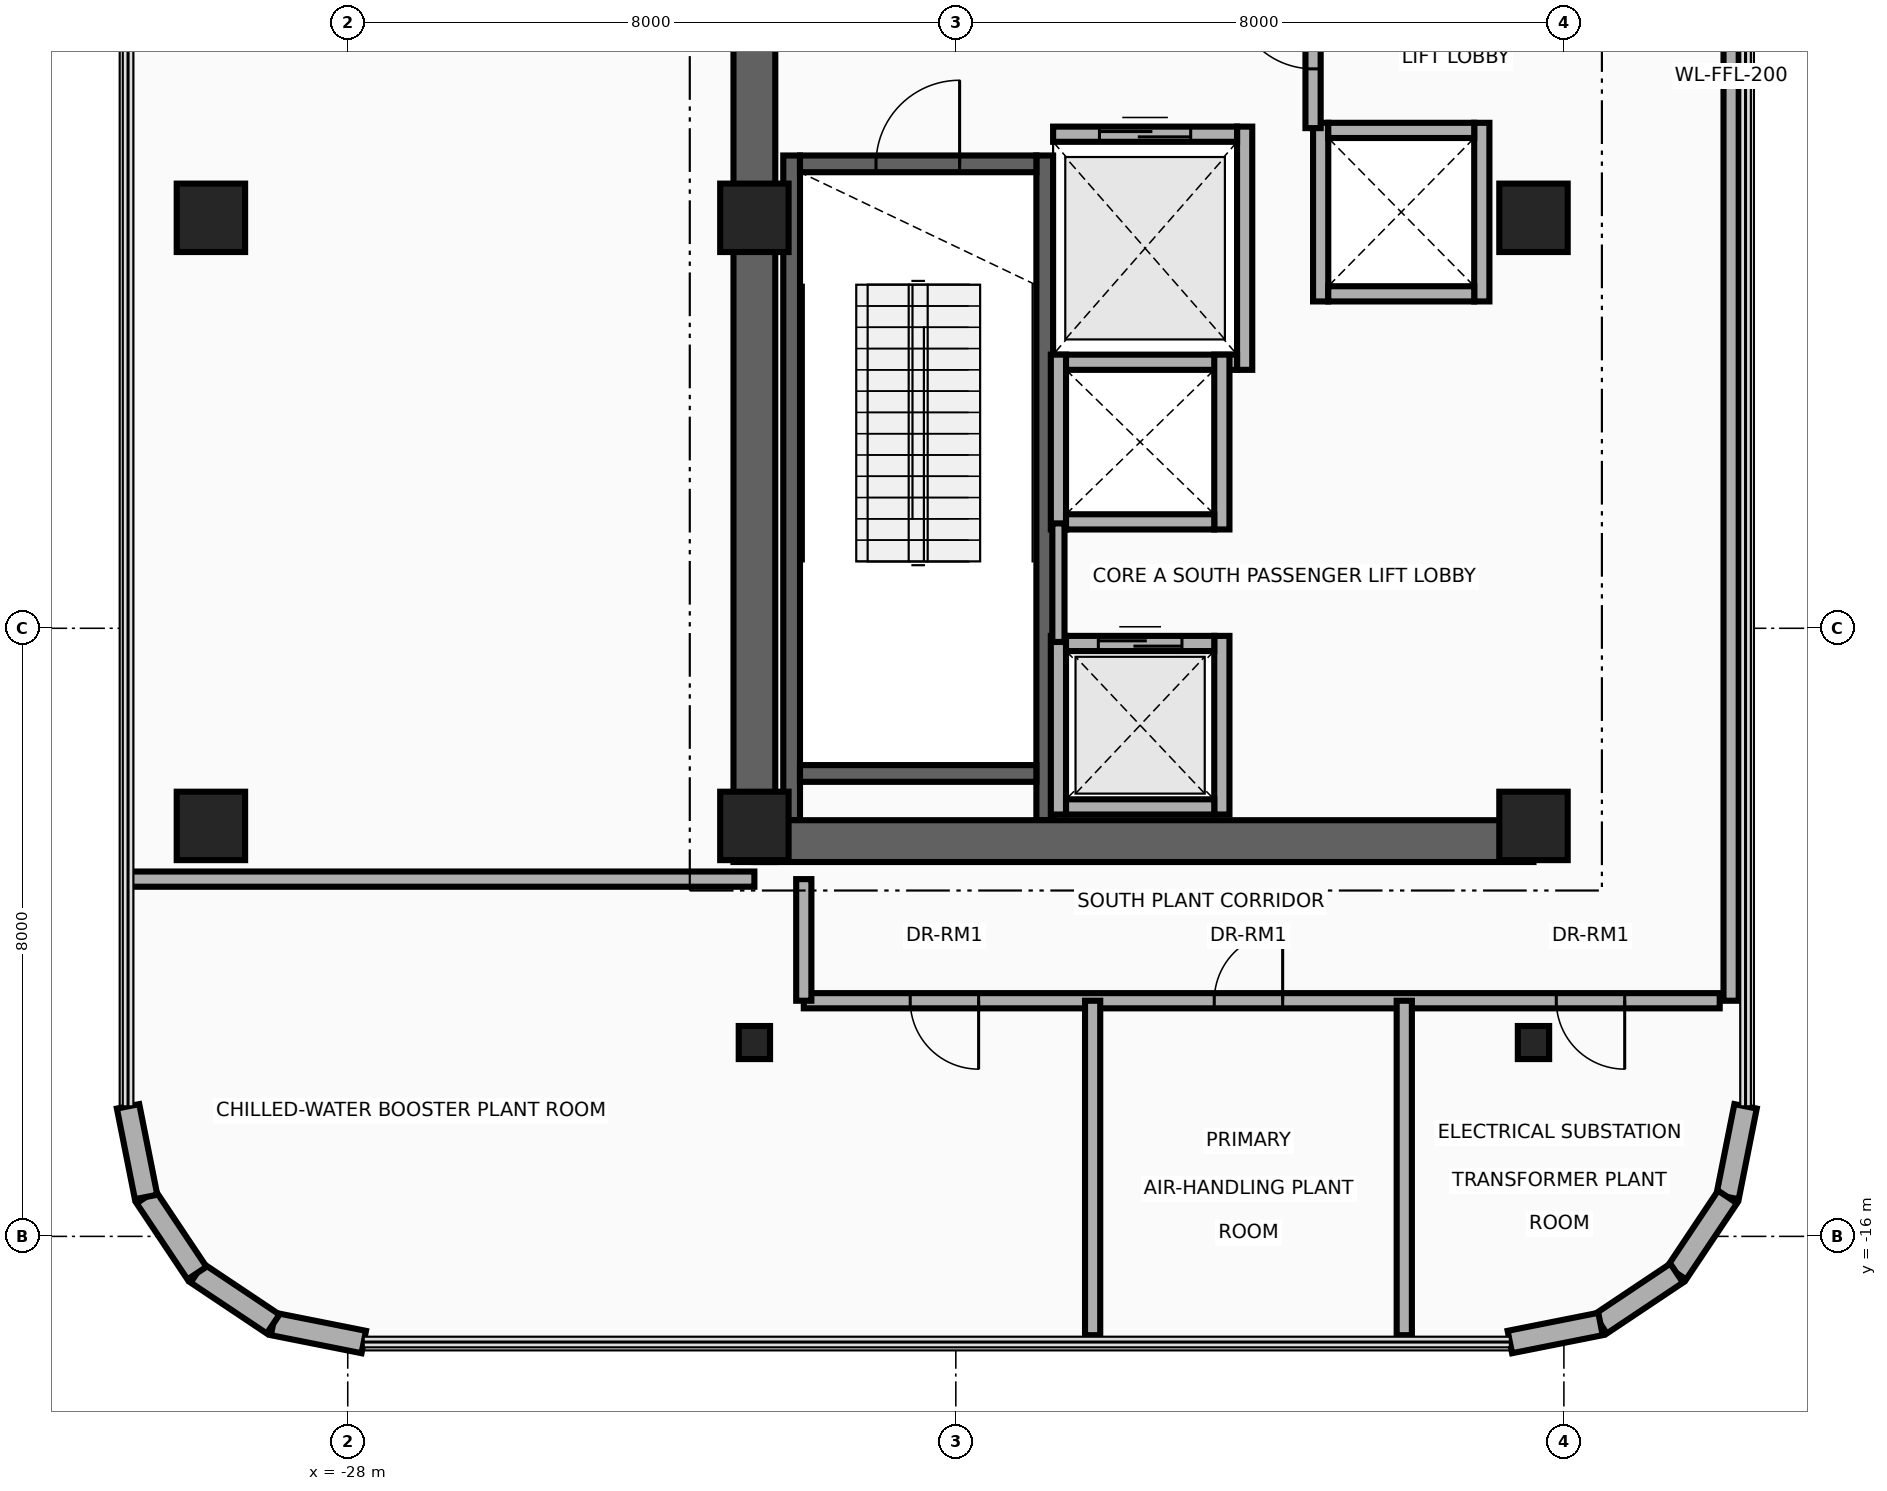
"""IFC4 building model, lengths in metres.
Left out: names, types, materials, properties, quantities, classifications, styles, units other than length and angle.
Written with IfcOpenShell. Run it as: python <this file> out.ifc"""

import sys

from ifc_helpers import new_model, si_unit, direction, frame, frame_2d, origin, origin_2d, place, context, subcontext, project, spatial, rectangle, i_section, extrude, source, transform, mapped, element, fill, save


model = new_model("IFC4")
c1 = context("Model", 3, precision=1e-05, world=origin(), true_north=direction((0.0, 1.0)))
c2 = subcontext(c1, "Body", "Model", "MODEL_VIEW")
j1 = project(units=[si_unit("LENGTHUNIT", "METRE"), si_unit("PLANEANGLEUNIT", "RADIAN")], contexts=[c1])
p1 = place(None, origin())
s1 = spatial("IfcSite", under=j1, at=p1, CompositionType="ELEMENT")
p2 = place(p1, origin())
s2 = spatial("IfcBuilding", under=s1, at=p2, CompositionType="ELEMENT")
p3 = place(p2, frame((0.0, 0.0, 196.3)))
s3 = spatial("IfcBuildingStorey", under=s2, at=p3, CompositionType="ELEMENT", Elevation=196.3)
for number, where, z_axis, x_axis in (
    (1, (-22.16, -10.525, 0.0), (0.0, 0.0, 1.0), (0.0, 1.0, 0.0)),
    (2, (-18.83, -10.525, 0.0), (0.0, 0.0, 1.0), (0.0, 1.0, 0.0)),
):
    element("IfcWall", number, at=place(p3, frame(where, z_axis=z_axis, x_axis=x_axis)), inside=s3, PredefinedType="SHEAR", context=c2, shape_type="SweptSolid", body=[
        extrude(rectangle(XDim=8.745, YDim=0.22, at=frame_2d((4.373, 0.0))), origin(), (0.0, 0.0, 1.0), 4.46),
    ])
p4 = place(p3, frame((-22.05, -9.91, 0.0), z_axis=(0.0, 0.0, 1.0), x_axis=(1.0, 0.0, 0.0)))
e3 = element("IfcWall", 3, at=p4, inside=s3, PredefinedType="SHEAR", context=c2, shape_type="SweptSolid", body=[
    extrude(rectangle(XDim=3.11, YDim=0.22, at=frame_2d((1.555, 0.0))), origin(), (0.0, 0.0, 1.0), 4.46),
])
p5 = place(p3, frame((-22.05, -1.89, 0.0), z_axis=(0.0, 0.0, 1.0), x_axis=(1.0, 0.0, 0.0)))
e4 = element("IfcWall", 4, at=p5, inside=s3, PredefinedType="SHEAR", context=c2, shape_type="SweptSolid", body=[
    extrude(rectangle(XDim=3.11, YDim=0.22, at=frame_2d((1.555, 0.0))), origin(), (0.0, 0.0, 1.0), 4.46),
])
p6 = place(p5, frame((1.0, 0.0, 0.0)))
e5 = element("IfcOpeningElement", 5, at=p6, cuts=e4, PredefinedType="OPENING", context=c2, shape_type="SweptSolid", body=[
    extrude(rectangle(XDim=1.1, YDim=2.15, at=frame_2d((0.55, 1.075))), frame((0.0, 0.125, 0.0), z_axis=(0.0, -1.0, 0.0), x_axis=(1.0, 0.0, 0.0)), (0.0, 0.0, 1.0), 0.25),
])
p7 = place(p3, frame((-22.65, -11.075, 0.0), z_axis=(0.0, 0.0, 1.0), x_axis=(0.0, 1.0, 0.0)))
e6 = element("IfcWall", 6, at=p7, inside=s3, PredefinedType="SHEAR", context=c2, shape_type="SweptSolid", body=[
    extrude(rectangle(XDim=22.15, YDim=0.55, at=frame_2d((11.075, 0.0))), origin(), (0.0, 0.0, 1.0), 4.46),
])
p8 = place(p3, frame((-22.65, -10.8, 0.0), z_axis=(0.0, 0.0, 1.0), x_axis=(1.0, 0.0, 0.0)))
e7 = element("IfcWall", 7, at=p8, inside=s3, PredefinedType="SHEAR", context=c2, shape_type="SweptSolid", body=[
    extrude(rectangle(XDim=10.25, YDim=0.55, at=frame_2d((5.125, 0.0))), origin(), (0.0, 0.0, 1.0), 4.46),
])
m1 = source(origin(), c2, "Body", "SweptSolid", [
    extrude(rectangle(XDim=0.9, YDim=0.9, at=origin_2d()), origin(), (0.0, 0.0, 1.0), 4.7),
])
for number, where, z_axis, x_axis in (
    (8, (-29.8, -10.6, 0.0), (0.0, 0.0, 1.0), (1.0, 0.0, 0.0)),
    (9, (-22.65, -10.6, 0.0), (0.0, 0.0, 1.0), (1.0, 0.0, 0.0)),
    (10, (-12.4, -10.6, 0.0), (0.0, 0.0, 1.0), (1.0, 0.0, 0.0)),
    (11, (-29.8, -2.6, 0.0), (0.0, 0.0, 1.0), (1.0, 0.0, 0.0)),
    (12, (-22.65, -2.6, 0.0), (0.0, 0.0, 1.0), (1.0, 0.0, 0.0)),
    (13, (-12.4, -2.6, 0.0), (0.0, 0.0, 1.0), (1.0, 0.0, 0.0)),
):
    element("IfcColumn", number, at=place(p3, frame(where, z_axis=z_axis, x_axis=x_axis)), inside=s3, PredefinedType="COLUMN", context=c2, shape_type="MappedRepresentation", body=[
        mapped(m1, transform((0.0, 0.0, 0.0), x_axis=(1.0, 0.0, 0.0), y_axis=(0.0, 1.0, 0.0), z_axis=(0.0, 0.0, 1.0), scale=1.0)),
    ])
m2 = source(origin(), c2, "Body", "SweptSolid", [
    extrude(i_section(OverallWidth=0.412, OverallDepth=0.435, WebThickness=0.036, FlangeThickness=0.057, at=origin_2d()), origin(), (0.0, 0.0, 1.0), 4.7),
])
for number, where, z_axis, x_axis in (
    (14, (-22.65, -13.45, 0.0), (0.0, 0.0, 1.0), (1.0, 0.0, 0.0)),
    (15, (-12.4, -13.45, 0.0), (0.0, 0.0, 1.0), (1.0, 0.0, 0.0)),
):
    element("IfcColumn", number, at=place(p3, frame(where, z_axis=z_axis, x_axis=x_axis)), inside=s3, PredefinedType="COLUMN", context=c2, shape_type="MappedRepresentation", body=[
        mapped(m2, transform((0.0, 0.0, 0.0), x_axis=(1.0, 0.0, 0.0), y_axis=(0.0, 1.0, 0.0), z_axis=(0.0, 0.0, 1.0), scale=1.0)),
    ])
p9 = place(p3, frame((-9.61, -14.289, 0.0), z_axis=(0.0, 0.0, 1.0), x_axis=(-0.194996050505, -0.980804027463, 0.0)))
e16 = element("IfcWall", 16, at=p9, inside=s3, PredefinedType="SOLIDWALL", context=c2, shape_type="SweptSolid", body=[
    extrude(rectangle(XDim=1.216, YDim=0.3, at=frame_2d((0.608, 0.0))), origin(), (0.0, 0.0, 1.0), 4.46),
])
for number, where, z_axis, x_axis in (
    (17, (-9.847, -15.482, 0.0), (0.0, 0.0, 1.0), (-0.556, -0.831, 0.0)),
    (18, (-10.517, -16.483, 0.0), (0.0, 0.0, 1.0), (-0.831, -0.556, 0.0)),
):
    element("IfcWall", number, at=place(p3, frame(where, z_axis=z_axis, x_axis=x_axis)), inside=s3, PredefinedType="SOLIDWALL", context=c2, shape_type="SweptSolid", body=[
        extrude(rectangle(XDim=1.205, YDim=0.3, at=frame_2d((0.603, 0.0))), origin(), (0.0, 0.0, 1.0), 4.46),
    ])
for number, where, z_axis, x_axis in (
    (19, (-11.518, -17.153, 0.0), (0.0, 0.0, 1.0), (-0.981, -0.195, 0.0)),
    (20, (-27.789, -17.39, 0.0), (0.0, 0.0, 1.0), (-0.981, 0.195, 0.0)),
):
    element("IfcWall", number, at=place(p3, frame(where, z_axis=z_axis, x_axis=x_axis)), inside=s3, PredefinedType="SOLIDWALL", context=c2, shape_type="SweptSolid", body=[
        extrude(rectangle(XDim=1.216, YDim=0.3, at=frame_2d((0.608, 0.0))), origin(), (0.0, 0.0, 1.0), 4.46),
    ])
for number, where, z_axis, x_axis in (
    (21, (-28.982, -17.153, 0.0), (0.0, 0.0, 1.0), (-0.831, 0.556, 0.0)),
    (22, (-29.983, -16.483, 0.0), (0.0, 0.0, 1.0), (-0.556, 0.831, 0.0)),
):
    element("IfcWall", number, at=place(p3, frame(where, z_axis=z_axis, x_axis=x_axis)), inside=s3, PredefinedType="SOLIDWALL", context=c2, shape_type="SweptSolid", body=[
        extrude(rectangle(XDim=1.205, YDim=0.3, at=frame_2d((0.603, 0.0))), origin(), (0.0, 0.0, 1.0), 4.46),
    ])
p10 = place(p3, frame((-30.653, -15.482, 0.0), z_axis=(0.0, 0.0, 1.0), x_axis=(-0.194996050505, 0.980804027463, 0.0)))
e23 = element("IfcWall", 23, at=p10, inside=s3, PredefinedType="SOLIDWALL", context=c2, shape_type="SweptSolid", body=[
    extrude(rectangle(XDim=1.216, YDim=0.3, at=frame_2d((0.608, 0.0))), origin(), (0.0, 0.0, 1.0), 4.46),
])
p11 = place(p3, frame((-16.2, -4.6, 0.0), z_axis=(0.0, 0.0, 1.0), x_axis=(0.0, 1.0, 0.0)))
e24 = element("IfcWall", 24, at=p11, inside=s3, PredefinedType="MOVABLE", context=c2, shape_type="SweptSolid", body=[
    extrude(rectangle(XDim=3.2, YDim=0.2, at=frame_2d((1.6, 0.0))), origin(), (0.0, 0.0, 1.0), 4.46),
])
p12 = place(p3, frame((-18.72, -4.5, 0.0), z_axis=(0.0, 0.0, 1.0), x_axis=(1.0, 0.0, 0.0)))
e25 = element("IfcWall", 25, at=p12, inside=s3, PredefinedType="MOVABLE", context=c2, shape_type="SweptSolid", body=[
    extrude(rectangle(XDim=2.42, YDim=0.2, at=frame_2d((1.21, 0.0))), origin(), (0.0, 0.0, 1.0), 4.46),
])
p13 = place(p3, frame((-18.72, -1.5, 0.0), z_axis=(0.0, 0.0, 1.0), x_axis=(1.0, 0.0, 0.0)))
e26 = element("IfcWall", 26, at=p13, inside=s3, PredefinedType="MOVABLE", context=c2, shape_type="SweptSolid", body=[
    extrude(rectangle(XDim=2.42, YDim=0.2, at=frame_2d((1.21, 0.0))), origin(), (0.0, 0.0, 1.0), 4.46),
])
p14 = place(p13, frame((0.61, 0.0, 0.0)))
e27 = element("IfcOpeningElement", 27, at=p14, cuts=e26, PredefinedType="OPENING", context=c2, shape_type="SweptSolid", body=[
    extrude(rectangle(XDim=1.2, YDim=2.1, at=frame_2d((0.6, 1.05))), frame((0.0, 0.115, 0.0), z_axis=(0.0, -1.0, 0.0), x_axis=(1.0, 0.0, 0.0)), (0.0, 0.0, 1.0), 0.23),
])
for number, where, z_axis, x_axis in (
    (28, (-18.65, -10.45, 0.0), (0.0, 0.0, 1.0), (0.0, 1.0, 0.0)),
    (29, (-16.5, -10.45, 0.0), (0.0, 0.0, 1.0), (0.0, 1.0, 0.0)),
):
    element("IfcWall", number, at=place(p3, frame(where, z_axis=z_axis, x_axis=x_axis)), inside=s3, PredefinedType="MOVABLE", context=c2, shape_type="SweptSolid", body=[
        extrude(rectangle(XDim=2.35, YDim=0.2, at=frame_2d((1.175, 0.0))), origin(), (0.0, 0.0, 1.0), 3.744),
    ])
p15 = place(p3, frame((-18.55, -10.35, 0.0), z_axis=(0.0, 0.0, 1.0), x_axis=(1.0, 0.0, 0.0)))
e30 = element("IfcWall", 30, at=p15, inside=s3, PredefinedType="MOVABLE", context=c2, shape_type="SweptSolid", body=[
    extrude(rectangle(XDim=1.95, YDim=0.2, at=frame_2d((0.975, 0.0))), origin(), (0.0, 0.0, 1.0), 3.744),
])
p16 = place(p3, frame((-18.55, -8.2, 0.0), z_axis=(0.0, 0.0, 1.0), x_axis=(1.0, 0.0, 0.0)))
e31 = element("IfcWall", 31, at=p16, inside=s3, PredefinedType="MOVABLE", context=c2, shape_type="SweptSolid", body=[
    extrude(rectangle(XDim=1.95, YDim=0.2, at=frame_2d((0.975, 0.0))), origin(), (0.0, 0.0, 1.0), 4.46),
])
p17 = place(p16, frame((0.425, 0.0, 0.0)))
e32 = element("IfcOpeningElement", 32, at=p17, cuts=e31, PredefinedType="OPENING", context=c2, shape_type="SweptSolid", body=[
    extrude(rectangle(XDim=1.1, YDim=2.1, at=frame_2d((0.55, 1.05))), frame((0.0, 0.115, 0.0), z_axis=(0.0, -1.0, 0.0), x_axis=(1.0, 0.0, 0.0)), (0.0, 0.0, 1.0), 0.23),
])
for number, where, z_axis, x_axis in (
    (33, (-18.65, -6.7, 0.0), (0.0, 0.0, 1.0), (0.0, 1.0, 0.0)),
    (34, (-16.5, -6.7, 0.0), (0.0, 0.0, 1.0), (0.0, 1.0, 0.0)),
):
    element("IfcWall", number, at=place(p3, frame(where, z_axis=z_axis, x_axis=x_axis)), inside=s3, PredefinedType="MOVABLE", context=c2, shape_type="SweptSolid", body=[
        extrude(rectangle(XDim=2.3, YDim=0.2, at=frame_2d((1.15, 0.0))), origin(), (0.0, 0.0, 1.0), 4.46),
    ])
p18 = place(p3, frame((-18.55, -6.6, 0.0), z_axis=(0.0, 0.0, 1.0), x_axis=(1.0, 0.0, 0.0)))
e35 = element("IfcWall", 35, at=p18, inside=s3, PredefinedType="MOVABLE", context=c2, shape_type="SweptSolid", body=[
    extrude(rectangle(XDim=1.95, YDim=0.2, at=frame_2d((0.975, 0.0))), origin(), (0.0, 0.0, 1.0), 4.46),
])
for number, where, z_axis, x_axis in (
    (36, (-15.2, -3.7, 0.0), (0.0, 0.0, 1.0), (0.0, 1.0, 0.0)),
    (37, (-13.08, -3.7, 0.0), (0.0, 0.0, 1.0), (0.0, 1.0, 0.0)),
):
    element("IfcWall", number, at=place(p3, frame(where, z_axis=z_axis, x_axis=x_axis)), inside=s3, PredefinedType="MOVABLE", context=c2, shape_type="SweptSolid", body=[
        extrude(rectangle(XDim=2.35, YDim=0.2, at=frame_2d((1.175, 0.0))), origin(), (0.0, 0.0, 1.0), 4.46),
    ])
for number, where, z_axis, x_axis in (
    (38, (-15.1, -3.6, 0.0), (0.0, 0.0, 1.0), (1.0, 0.0, 0.0)),
    (39, (-15.1, -1.45, 0.0), (0.0, 0.0, 1.0), (1.0, 0.0, 0.0)),
):
    element("IfcWall", number, at=place(p3, frame(where, z_axis=z_axis, x_axis=x_axis)), inside=s3, PredefinedType="MOVABLE", context=c2, shape_type="SweptSolid", body=[
        extrude(rectangle(XDim=1.92, YDim=0.2, at=frame_2d((0.96, 0.0))), origin(), (0.0, 0.0, 1.0), 4.46),
    ])
p19 = place(p3, frame((-15.3, -1.42, 0.0), z_axis=(0.0, 0.0, 1.0), x_axis=(0.0, 1.0, 0.0)))
e40 = element("IfcWall", 40, at=p19, inside=s3, PredefinedType="PARTITIONING", context=c2, shape_type="SweptSolid", body=[
    extrude(rectangle(XDim=2.67, YDim=0.2, at=frame_2d((1.335, 0.0))), origin(), (0.0, 0.0, 1.0), 4.46),
])
p20 = place(p19, frame((0.78, 0.0, 0.0)))
e41 = element("IfcOpeningElement", 41, at=p20, cuts=e40, PredefinedType="OPENING", context=c2, shape_type="SweptSolid", body=[
    extrude(rectangle(XDim=1.05, YDim=2.15, at=frame_2d((0.525, 1.075))), frame((0.0, 0.115, 0.0), z_axis=(0.0, -1.0, 0.0), x_axis=(1.0, 0.0, 0.0)), (0.0, 0.0, 1.0), 0.23),
])
p21 = place(p3, frame((-18.65, -8.18, 0.0), z_axis=(0.0, 0.0, 1.0), x_axis=(0.0, 1.0, 0.0)))
e42 = element("IfcWall", 42, at=p21, inside=s3, PredefinedType="PARTITIONING", context=c2, shape_type="SweptSolid", body=[
    extrude(rectangle(XDim=1.56, YDim=0.16, at=frame_2d((0.78, 0.0))), origin(), (0.0, 0.0, 1.0), 4.46),
])
p22 = place(p3, frame((-30.89, -11.3, 0.0), z_axis=(0.0, 0.0, 1.0), x_axis=(1.0, 0.0, 0.0)))
e43 = element("IfcWall", 43, at=p22, inside=s3, PredefinedType="PARTITIONING", context=c2, shape_type="SweptSolid", body=[
    extrude(rectangle(XDim=8.24, YDim=0.2, at=frame_2d((4.12, 0.0))), origin(), (0.0, 0.0, 1.0), 3.834),
])
p23 = place(p3, frame((-22.0, -12.9, 0.0), z_axis=(0.0, 0.0, 1.0), x_axis=(1.0, 0.0, 0.0)))
e44 = element("IfcWall", 44, at=p23, inside=s3, PredefinedType="PARTITIONING", context=c2, shape_type="SweptSolid", body=[
    extrude(rectangle(XDim=12.05, YDim=0.2, at=frame_2d((6.025, 0.0))), origin(), (0.0, 0.0, 1.0), 3.834),
])
p24 = place(p23, frame((1.4, 0.0, 0.0)))
e45 = element("IfcOpeningElement", 45, at=p24, cuts=e44, PredefinedType="OPENING", context=c2, shape_type="SweptSolid", body=[
    extrude(rectangle(XDim=0.9, YDim=2.1, at=frame_2d((0.45, 1.05))), frame((0.0, 0.115, 0.0), z_axis=(0.0, -1.0, 0.0), x_axis=(1.0, 0.0, 0.0)), (0.0, 0.0, 1.0), 0.23),
])
p25 = place(p23, frame((5.4, 0.0, 0.0)))
e46 = element("IfcOpeningElement", 46, at=p25, cuts=e44, PredefinedType="OPENING", context=c2, shape_type="SweptSolid", body=[
    extrude(rectangle(XDim=0.9, YDim=2.1, at=frame_2d((0.45, 1.05))), frame((0.0, 0.115, 0.0), z_axis=(0.0, -1.0, 0.0), x_axis=(1.0, 0.0, 0.0)), (0.0, 0.0, 1.0), 0.23),
])
p26 = place(p23, frame((9.9, 0.0, 0.0)))
e47 = element("IfcOpeningElement", 47, at=p26, cuts=e44, PredefinedType="OPENING", context=c2, shape_type="SweptSolid", body=[
    extrude(rectangle(XDim=0.9, YDim=2.1, at=frame_2d((0.45, 1.05))), frame((0.0, 0.115, 0.0), z_axis=(0.0, -1.0, 0.0), x_axis=(1.0, 0.0, 0.0)), (0.0, 0.0, 1.0), 0.23),
])
for number, where, z_axis, x_axis in (
    (48, (-18.2, -17.3, 0.0), (0.0, 0.0, 1.0), (0.0, 1.0, 0.0)),
    (49, (-14.1, -17.3, 0.0), (0.0, 0.0, 1.0), (0.0, 1.0, 0.0)),
):
    element("IfcWall", number, at=place(p3, frame(where, z_axis=z_axis, x_axis=x_axis)), inside=s3, PredefinedType="PARTITIONING", context=c2, shape_type="SweptSolid", body=[
        extrude(rectangle(XDim=4.4, YDim=0.2, at=frame_2d((2.2, 0.0))), origin(), (0.0, 0.0, 1.0), 3.906),
    ])
p27 = place(p3, frame((-22.0, -12.9, 0.0), z_axis=(0.0, 0.0, 1.0), x_axis=(0.0, 1.0, 0.0)))
e50 = element("IfcWall", 50, at=p27, inside=s3, PredefinedType="PARTITIONING", context=c2, shape_type="SweptSolid", body=[
    extrude(rectangle(XDim=1.6, YDim=0.2, at=frame_2d((0.8, 0.0))), origin(), (0.0, 0.0, 1.0), 3.988),
])
p28 = place(p3, frame((-9.8, -12.9, 0.0), z_axis=(0.0, 0.0, 1.0), x_axis=(0.0, 1.0, 0.0)))
e51 = element("IfcWall", 51, at=p28, inside=s3, PredefinedType="PARTITIONING", context=c2, shape_type="SweptSolid", body=[
    extrude(rectangle(XDim=24.32, YDim=0.2, at=frame_2d((12.16, 0.0))), origin(), (0.0, 0.0, 1.0), 3.744),
])
p29 = place(p14, origin())
e52 = element("IfcDoor", 52, at=p29, inside=s3, OperationType="DOUBLE_DOOR_SLIDING", PredefinedType="DOOR", context=c2, shape_type="SweptSolid", body=[
    extrude(rectangle(XDim=1.2, YDim=2.1, at=frame_2d((0.6, 1.05))), frame((0.0, 0.025, 0.0), z_axis=(0.0, -1.0, 0.0), x_axis=(1.0, 0.0, 0.0)), (0.0, 0.0, 1.0), 0.05),
])
fill(e27, e52)
p30 = place(p17, origin())
e53 = element("IfcDoor", 53, at=p30, inside=s3, OperationType="DOUBLE_DOOR_SLIDING", PredefinedType="DOOR", context=c2, shape_type="SweptSolid", body=[
    extrude(rectangle(XDim=1.1, YDim=2.1, at=frame_2d((0.55, 1.05))), frame((0.0, 0.025, 0.0), z_axis=(0.0, -1.0, 0.0), x_axis=(1.0, 0.0, 0.0)), (0.0, 0.0, 1.0), 0.05),
])
fill(e32, e53)
p31 = place(p20, origin())
e54 = element("IfcDoor", 54, at=p31, inside=s3, OperationType="SINGLE_SWING_RIGHT", PredefinedType="DOOR", context=c2, shape_type="SweptSolid", body=[
    extrude(rectangle(XDim=1.05, YDim=2.15, at=frame_2d((0.525, 1.075))), frame((0.0, 0.025, 0.0), z_axis=(0.0, -1.0, 0.0), x_axis=(1.0, 0.0, 0.0)), (0.0, 0.0, 1.0), 0.05),
])
fill(e41, e54)
p32 = place(p6, origin())
e55 = element("IfcDoor", 55, at=p32, inside=s3, OperationType="SINGLE_SWING_RIGHT", PredefinedType="DOOR", context=c2, shape_type="SweptSolid", body=[
    extrude(rectangle(XDim=1.1, YDim=2.15, at=frame_2d((0.55, 1.075))), frame((0.0, 0.025, 0.0), z_axis=(0.0, -1.0, 0.0), x_axis=(1.0, 0.0, 0.0)), (0.0, 0.0, 1.0), 0.05),
])
fill(e5, e55)
p33 = place(p24, frame((0.9, 0.0, 0.0), z_axis=(0.0, 0.0, 1.0), x_axis=(-1.0, 0.0, 0.0)))
e56 = element("IfcDoor", 56, at=p33, inside=s3, OperationType="SINGLE_SWING_LEFT", PredefinedType="DOOR", context=c2, shape_type="SweptSolid", body=[
    extrude(rectangle(XDim=0.9, YDim=2.1, at=frame_2d((0.45, 1.05))), frame((0.0, 0.025, 0.0), z_axis=(0.0, -1.0, 0.0), x_axis=(1.0, 0.0, 0.0)), (0.0, 0.0, 1.0), 0.05),
])
fill(e45, e56)
p34 = place(p25, origin())
e57 = element("IfcDoor", 57, at=p34, inside=s3, OperationType="SINGLE_SWING_RIGHT", PredefinedType="DOOR", context=c2, shape_type="SweptSolid", body=[
    extrude(rectangle(XDim=0.9, YDim=2.1, at=frame_2d((0.45, 1.05))), frame((0.0, 0.025, 0.0), z_axis=(0.0, -1.0, 0.0), x_axis=(1.0, 0.0, 0.0)), (0.0, 0.0, 1.0), 0.05),
])
fill(e46, e57)
p35 = place(p26, frame((0.9, 0.0, 0.0), z_axis=(0.0, 0.0, 1.0), x_axis=(-1.0, 0.0, 0.0)))
e58 = element("IfcDoor", 58, at=p35, inside=s3, OperationType="SINGLE_SWING_LEFT", PredefinedType="DOOR", context=c2, shape_type="SweptSolid", body=[
    extrude(rectangle(XDim=0.9, YDim=2.1, at=frame_2d((0.45, 1.05))), frame((0.0, 0.025, 0.0), z_axis=(0.0, -1.0, 0.0), x_axis=(1.0, 0.0, 0.0)), (0.0, 0.0, 1.0), 0.05),
])
fill(e47, e58)
save(model, sys.argv[1])
